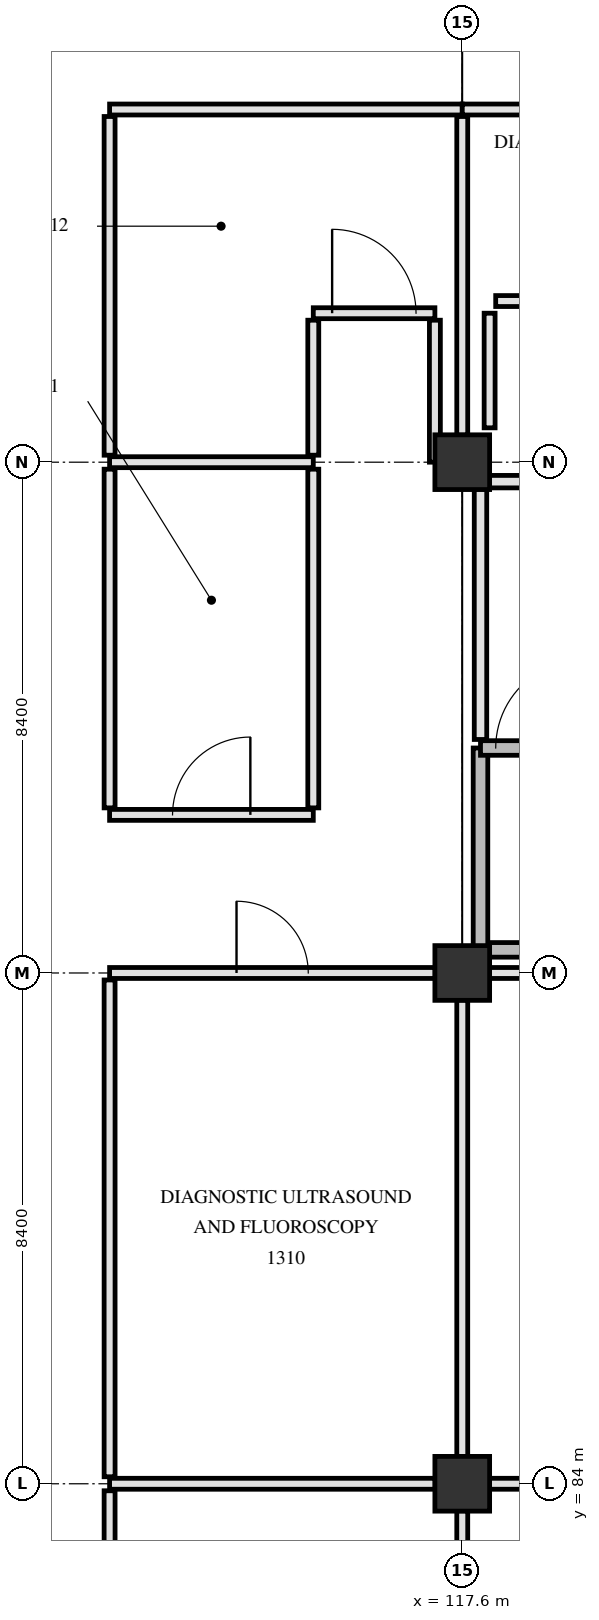
"""IFC4 building model, lengths in metres.
Left out: names, types, materials, properties, quantities, classifications, styles, units other than length and angle.
Written with IfcOpenShell. Run it as: python <this file> out.ifc"""

import sys

from ifc_helpers import new_model, si_unit, direction, frame, frame_2d, origin, origin_2d, place, context, subcontext, project, spatial, rectangle, extrude, element, fill, save


model = new_model("IFC4")
c1 = context("Model", 3, precision=1e-05, world=origin(), true_north=direction((0.0, 1.0)))
c2 = subcontext(c1, "Body", "Model", "MODEL_VIEW")
j1 = project(units=[si_unit("LENGTHUNIT", "METRE"), si_unit("PLANEANGLEUNIT", "RADIAN")], contexts=[c1])
p1 = place(None, origin())
s1 = spatial("IfcSite", under=j1, at=p1, CompositionType="ELEMENT")
p2 = place(p1, origin())
s2 = spatial("IfcBuilding", under=s1, at=p2, CompositionType="ELEMENT")
p3 = place(p2, origin())
s3 = spatial("IfcBuildingStorey", under=s2, at=p3, CompositionType="ELEMENT", Elevation=0.0)
for number, where, z_axis, x_axis in (
    (1, (117.6, 84.0, 0.0), (0.0, 0.0, 1.0), (1.0, 0.0, 0.0)),
    (2, (117.6, 92.4, 0.0), (0.0, 0.0, 1.0), (1.0, 0.0, 0.0)),
    (3, (117.6, 100.8, 0.0), (0.0, 0.0, 1.0), (1.0, 0.0, 0.0)),
):
    element("IfcColumn", number, at=place(p3, frame(where, z_axis=z_axis, x_axis=x_axis)), inside=s3, PredefinedType="COLUMN", context=c2, shape_type="SweptSolid", body=[
        extrude(rectangle(XDim=0.9, YDim=0.9, at=origin_2d()), origin(), (0.0, 0.0, 1.0), 4.8),
    ])
p4 = place(p3, frame((117.9, 92.78, 0.0), z_axis=(0.0, 0.0, 1.0), x_axis=(1.0, 0.0, 0.0)))
e4 = element("IfcWall", 4, at=p4, inside=s3, PredefinedType="SHEAR", context=c2, shape_type="SweptSolid", body=[
    extrude(rectangle(XDim=7.82, YDim=0.24, at=frame_2d((3.91, 0.0))), origin(), (0.0, 0.0, 1.0), 4.5),
])
p5 = place(p3, frame((117.9, 92.78, 0.0), z_axis=(0.0, 0.0, 1.0), x_axis=(0.0, 1.0, 0.0)))
e5 = element("IfcWall", 5, at=p5, inside=s3, PredefinedType="SHEAR", context=c2, shape_type="SweptSolid", body=[
    extrude(rectangle(XDim=3.32, YDim=0.24, at=frame_2d((1.66, 0.0))), origin(), (0.0, 0.0, 1.0), 4.5),
])
p6 = place(p3, frame((117.9, 96.1, 0.0), z_axis=(0.0, 0.0, 1.0), x_axis=(1.0, 0.0, 0.0)))
e6 = element("IfcWall", 6, at=p6, inside=s3, PredefinedType="SHEAR", context=c2, shape_type="SweptSolid", body=[
    extrude(rectangle(XDim=7.82, YDim=0.24, at=frame_2d((3.91, 0.0))), origin(), (0.0, 0.0, 1.0), 4.5),
])
p7 = place(p6, frame((0.25, 0.0, 0.0)))
e7 = element("IfcOpeningElement", 7, at=p7, cuts=e6, PredefinedType="OPENING", context=c2, shape_type="SweptSolid", body=[
    extrude(rectangle(XDim=1.45, YDim=2.2, at=frame_2d((0.725, 1.1))), frame((0.0, 0.13, 0.0), z_axis=(0.0, -1.0, 0.0), x_axis=(1.0, 0.0, 0.0)), (0.0, 0.0, 1.0), 0.26),
])
p8 = place(p3, frame((117.9, 96.24, 0.0), z_axis=(0.0, 0.0, 1.0), x_axis=(0.0, 1.0, 0.0)))
e8 = element("IfcWall", 8, at=p8, inside=s3, PredefinedType="PARTITIONING", context=c2, shape_type="SweptSolid", body=[
    extrude(rectangle(XDim=4.12, YDim=0.205, at=frame_2d((2.06, 0.0))), origin(), (0.0, 0.0, 1.0), 3.89),
])
p9 = place(p3, frame((117.9, 100.48, 0.0), z_axis=(0.0, 0.0, 1.0), x_axis=(1.0, 0.0, 0.0)))
e9 = element("IfcWall", 9, at=p9, inside=s3, PredefinedType="PARTITIONING", context=c2, shape_type="SweptSolid", body=[
    extrude(rectangle(XDim=4.18, YDim=0.205, at=frame_2d((2.09, 0.0))), origin(), (0.0, 0.0, 1.0), 3.84),
])
p10 = place(p9, frame((1.29, 0.0, 0.0)))
e10 = element("IfcOpeningElement", 10, at=p10, cuts=e9, PredefinedType="OPENING", context=c2, shape_type="SweptSolid", body=[
    extrude(rectangle(XDim=1.6, YDim=2.25, at=frame_2d((0.8, 1.125))), frame((0.0, 0.113, 0.0), z_axis=(0.0, -1.0, 0.0), x_axis=(1.0, 0.0, 0.0)), (0.0, 0.0, 1.0), 0.225),
])
p11 = place(p3, frame((111.8, 84.0, 0.0), z_axis=(0.0, 0.0, 1.0), x_axis=(1.0, 0.0, 0.0)))
e11 = element("IfcWall", 11, at=p11, inside=s3, PredefinedType="PARTITIONING", context=c2, shape_type="SweptSolid", body=[
    extrude(rectangle(XDim=5.355, YDim=0.18, at=frame_2d((2.677, 0.0))), origin(), (0.0, 0.0, 1.0), 3.84),
])
p12 = place(p3, frame((118.045, 84.0, 0.0), z_axis=(0.0, 0.0, 1.0), x_axis=(1.0, 0.0, 0.0)))
e12 = element("IfcWall", 12, at=p12, inside=s3, PredefinedType="PARTITIONING", context=c2, shape_type="SweptSolid", body=[
    extrude(rectangle(XDim=5.505, YDim=0.18, at=frame_2d((2.752, 0.0))), origin(), (0.0, 0.0, 1.0), 3.84),
])
p13 = place(p3, frame((111.8, 92.4, 0.0), z_axis=(0.0, 0.0, 1.0), x_axis=(1.0, 0.0, 0.0)))
e13 = element("IfcWall", 13, at=p13, inside=s3, PredefinedType="PARTITIONING", context=c2, shape_type="SweptSolid", body=[
    extrude(rectangle(XDim=5.355, YDim=0.18, at=frame_2d((2.677, 0.0))), origin(), (0.0, 0.0, 1.0), 3.84),
])
p14 = place(p13, frame((2.087, 0.0, 0.0)))
e14 = element("IfcOpeningElement", 14, at=p14, cuts=e13, PredefinedType="OPENING", context=c2, shape_type="SweptSolid", body=[
    extrude(rectangle(XDim=1.18, YDim=2.18, at=frame_2d((0.59, 1.09))), frame((0.0, 0.1, 0.0), z_axis=(0.0, -1.0, 0.0), x_axis=(1.0, 0.0, 0.0)), (0.0, 0.0, 1.0), 0.2),
])
p15 = place(p3, frame((118.045, 92.4, 0.0), z_axis=(0.0, 0.0, 1.0), x_axis=(1.0, 0.0, 0.0)))
e15 = element("IfcWall", 15, at=p15, inside=s3, PredefinedType="PARTITIONING", context=c2, shape_type="SweptSolid", body=[
    extrude(rectangle(XDim=7.51, YDim=0.18, at=frame_2d((3.755, 0.0))), origin(), (0.0, 0.0, 1.0), 3.84),
])
p16 = place(p3, frame((111.8, 95.0, 0.0), z_axis=(0.0, 0.0, 1.0), x_axis=(1.0, 0.0, 0.0)))
e16 = element("IfcWall", 16, at=p16, inside=s3, PredefinedType="PARTITIONING", context=c2, shape_type="SweptSolid", body=[
    extrude(rectangle(XDim=3.35, YDim=0.18, at=frame_2d((1.675, 0.0))), origin(), (0.0, 0.0, 1.0), 4.49),
])
p17 = place(p16, frame((1.035, 0.0, 0.0)))
e17 = element("IfcOpeningElement", 17, at=p17, cuts=e16, PredefinedType="OPENING", context=c2, shape_type="SweptSolid", body=[
    extrude(rectangle(XDim=1.28, YDim=2.18, at=frame_2d((0.64, 1.09))), frame((0.0, 0.1, 0.0), z_axis=(0.0, -1.0, 0.0), x_axis=(1.0, 0.0, 0.0)), (0.0, 0.0, 1.0), 0.2),
])
p18 = place(p3, frame((111.8, 100.8, 0.0), z_axis=(0.0, 0.0, 1.0), x_axis=(1.0, 0.0, 0.0)))
e18 = element("IfcWall", 18, at=p18, inside=s3, PredefinedType="PARTITIONING", context=c2, shape_type="SweptSolid", body=[
    extrude(rectangle(XDim=3.35, YDim=0.18, at=frame_2d((1.675, 0.0))), origin(), (0.0, 0.0, 1.0), 3.84),
])
p19 = place(p3, frame((115.15, 103.25, 0.0), z_axis=(0.0, 0.0, 1.0), x_axis=(1.0, 0.0, 0.0)))
e19 = element("IfcWall", 19, at=p19, inside=s3, PredefinedType="PARTITIONING", context=c2, shape_type="SweptSolid", body=[
    extrude(rectangle(XDim=2.0, YDim=0.18, at=frame_2d((1.0, 0.0))), origin(), (0.0, 0.0, 1.0), 4.49),
])
p20 = place(p19, frame((0.31, 0.0, 0.0)))
e20 = element("IfcOpeningElement", 20, at=p20, cuts=e19, PredefinedType="OPENING", context=c2, shape_type="SweptSolid", body=[
    extrude(rectangle(XDim=1.38, YDim=2.22, at=frame_2d((0.69, 1.11))), frame((0.0, 0.1, 0.0), z_axis=(0.0, -1.0, 0.0), x_axis=(1.0, 0.0, 0.0)), (0.0, 0.0, 1.0), 0.2),
])
p21 = place(p3, frame((118.15, 103.45, 0.0), z_axis=(0.0, 0.0, 1.0), x_axis=(1.0, 0.0, 0.0)))
e21 = element("IfcWall", 21, at=p21, inside=s3, PredefinedType="PARTITIONING", context=c2, shape_type="SweptSolid", body=[
    extrude(rectangle(XDim=7.85, YDim=0.18, at=frame_2d((3.925, 0.0))), origin(), (0.0, 0.0, 1.0), 3.89),
])
p22 = place(p21, frame((3.375, 0.0, 0.0)))
e22 = element("IfcOpeningElement", 22, at=p22, cuts=e21, PredefinedType="OPENING", context=c2, shape_type="SweptSolid", body=[
    extrude(rectangle(XDim=1.1, YDim=2.15, at=frame_2d((0.55, 1.075))), frame((0.0, 0.1, 0.0), z_axis=(0.0, -1.0, 0.0), x_axis=(1.0, 0.0, 0.0)), (0.0, 0.0, 1.0), 0.2),
])
p23 = place(p3, frame((111.8, 106.6, 0.0), z_axis=(0.0, 0.0, 1.0), x_axis=(1.0, 0.0, 0.0)))
e23 = element("IfcWall", 23, at=p23, inside=s3, PredefinedType="PARTITIONING", context=c2, shape_type="SweptSolid", body=[
    extrude(rectangle(XDim=5.8, YDim=0.18, at=frame_2d((2.9, 0.0))), origin(), (0.0, 0.0, 1.0), 3.89),
])
p24 = place(p3, frame((117.6, 106.6, 0.0), z_axis=(0.0, 0.0, 1.0), x_axis=(1.0, 0.0, 0.0)))
e24 = element("IfcWall", 24, at=p24, inside=s3, PredefinedType="PARTITIONING", context=c2, shape_type="SweptSolid", body=[
    extrude(rectangle(XDim=8.4, YDim=0.18, at=frame_2d((4.2, 0.0))), origin(), (0.0, 0.0, 1.0), 3.89),
])
p25 = place(p3, frame((111.8, 78.315, 0.0), z_axis=(0.0, 0.0, 1.0), x_axis=(0.0, 1.0, 0.0)))
e25 = element("IfcWall", 25, at=p25, inside=s3, PredefinedType="PARTITIONING", context=c2, shape_type="SweptSolid", body=[
    extrude(rectangle(XDim=5.57, YDim=0.18, at=frame_2d((2.785, 0.0))), origin(), (0.0, 0.0, 1.0), 3.84),
])
p26 = place(p3, frame((111.8, 84.115, 0.0), z_axis=(0.0, 0.0, 1.0), x_axis=(0.0, 1.0, 0.0)))
e26 = element("IfcWall", 26, at=p26, inside=s3, PredefinedType="PARTITIONING", context=c2, shape_type="SweptSolid", body=[
    extrude(rectangle(XDim=8.17, YDim=0.18, at=frame_2d((4.085, 0.0))), origin(), (0.0, 0.0, 1.0), 3.84),
])
for number, where, z_axis, x_axis in (
    (27, (111.8, 95.115, 0.0), (0.0, 0.0, 1.0), (0.0, 1.0, 0.0)),
    (28, (111.8, 100.915, 0.0), (0.0, 0.0, 1.0), (0.0, 1.0, 0.0)),
    (29, (115.15, 95.115, 0.0), (0.0, 0.0, 1.0), (0.0, 1.0, 0.0)),
):
    element("IfcWall", number, at=place(p3, frame(where, z_axis=z_axis, x_axis=x_axis)), inside=s3, PredefinedType="PARTITIONING", context=c2, shape_type="SweptSolid", body=[
        extrude(rectangle(XDim=5.57, YDim=0.18, at=frame_2d((2.785, 0.0))), origin(), (0.0, 0.0, 1.0), 3.84),
    ])
p27 = place(p3, frame((115.15, 100.915, 0.0), z_axis=(0.0, 0.0, 1.0), x_axis=(0.0, 1.0, 0.0)))
e30 = element("IfcWall", 30, at=p27, inside=s3, PredefinedType="PARTITIONING", context=c2, shape_type="SweptSolid", body=[
    extrude(rectangle(XDim=2.22, YDim=0.18, at=frame_2d((1.11, 0.0))), origin(), (0.0, 0.0, 1.0), 3.84),
])
p28 = place(p3, frame((117.15, 100.8, 0.0), z_axis=(0.0, 0.0, 1.0), x_axis=(0.0, 1.0, 0.0)))
e31 = element("IfcWall", 31, at=p28, inside=s3, PredefinedType="PARTITIONING", context=c2, shape_type="SweptSolid", body=[
    extrude(rectangle(XDim=2.335, YDim=0.18, at=frame_2d((1.167, 0.0))), origin(), (0.0, 0.0, 1.0), 3.84),
])
p29 = place(p3, frame((117.6, 78.315, 0.0), z_axis=(0.0, 0.0, 1.0), x_axis=(0.0, 1.0, 0.0)))
e32 = element("IfcWall", 32, at=p29, inside=s3, PredefinedType="PARTITIONING", context=c2, shape_type="SweptSolid", body=[
    extrude(rectangle(XDim=5.24, YDim=0.18, at=frame_2d((2.62, 0.0))), origin(), (0.0, 0.0, 1.0), 3.89),
])
p30 = place(p3, frame((117.6, 84.445, 0.0), z_axis=(0.0, 0.0, 1.0), x_axis=(0.0, 1.0, 0.0)))
e33 = element("IfcWall", 33, at=p30, inside=s3, PredefinedType="PARTITIONING", context=c2, shape_type="SweptSolid", body=[
    extrude(rectangle(XDim=7.51, YDim=0.18, at=frame_2d((3.755, 0.0))), origin(), (0.0, 0.0, 1.0), 3.89),
])
p31 = place(p3, frame((117.6, 101.245, 0.0), z_axis=(0.0, 0.0, 1.0), x_axis=(0.0, 1.0, 0.0)))
e34 = element("IfcWall", 34, at=p31, inside=s3, PredefinedType="PARTITIONING", context=c2, shape_type="SweptSolid", body=[
    extrude(rectangle(XDim=5.24, YDim=0.18, at=frame_2d((2.62, 0.0))), origin(), (0.0, 0.0, 1.0), 3.89),
])
p32 = place(p3, frame((118.05, 101.365, 0.0), z_axis=(0.0, 0.0, 1.0), x_axis=(0.0, 1.0, 0.0)))
e35 = element("IfcWall", 35, at=p32, inside=s3, PredefinedType="PARTITIONING", context=c2, shape_type="SweptSolid", body=[
    extrude(rectangle(XDim=1.885, YDim=0.18, at=frame_2d((0.942, 0.0))), origin(), (0.0, 0.0, 1.0), 4.49),
])
p33 = place(p7, origin())
e36 = element("IfcDoor", 36, at=p33, inside=s3, OperationType="SINGLE_SWING_RIGHT", PredefinedType="DOOR", context=c2, shape_type="SweptSolid", body=[
    extrude(rectangle(XDim=1.45, YDim=2.2, at=frame_2d((0.725, 1.1))), frame((0.0, 0.025, 0.0), z_axis=(0.0, -1.0, 0.0), x_axis=(1.0, 0.0, 0.0)), (0.0, 0.0, 1.0), 0.05),
])
fill(e7, e36)
p34 = place(p14, origin())
e37 = element("IfcDoor", 37, at=p34, inside=s3, OperationType="SINGLE_SWING_LEFT", PredefinedType="DOOR", context=c2, shape_type="SweptSolid", body=[
    extrude(rectangle(XDim=1.18, YDim=2.18, at=frame_2d((0.59, 1.09))), frame((0.0, 0.025, 0.0), z_axis=(0.0, -1.0, 0.0), x_axis=(1.0, 0.0, 0.0)), (0.0, 0.0, 1.0), 0.05),
])
fill(e14, e37)
p35 = place(p17, origin())
e38 = element("IfcDoor", 38, at=p35, inside=s3, OperationType="SINGLE_SWING_RIGHT", PredefinedType="DOOR", context=c2, shape_type="SweptSolid", body=[
    extrude(rectangle(XDim=1.28, YDim=2.18, at=frame_2d((0.64, 1.09))), frame((0.0, 0.025, 0.0), z_axis=(0.0, -1.0, 0.0), x_axis=(1.0, 0.0, 0.0)), (0.0, 0.0, 1.0), 0.05),
])
fill(e17, e38)
p36 = place(p20, origin())
e39 = element("IfcDoor", 39, at=p36, inside=s3, OperationType="SINGLE_SWING_LEFT", PredefinedType="DOOR", context=c2, shape_type="SweptSolid", body=[
    extrude(rectangle(XDim=1.38, YDim=2.22, at=frame_2d((0.69, 1.11))), frame((0.0, 0.025, 0.0), z_axis=(0.0, -1.0, 0.0), x_axis=(1.0, 0.0, 0.0)), (0.0, 0.0, 1.0), 0.05),
])
fill(e20, e39)
save(model, sys.argv[1])
